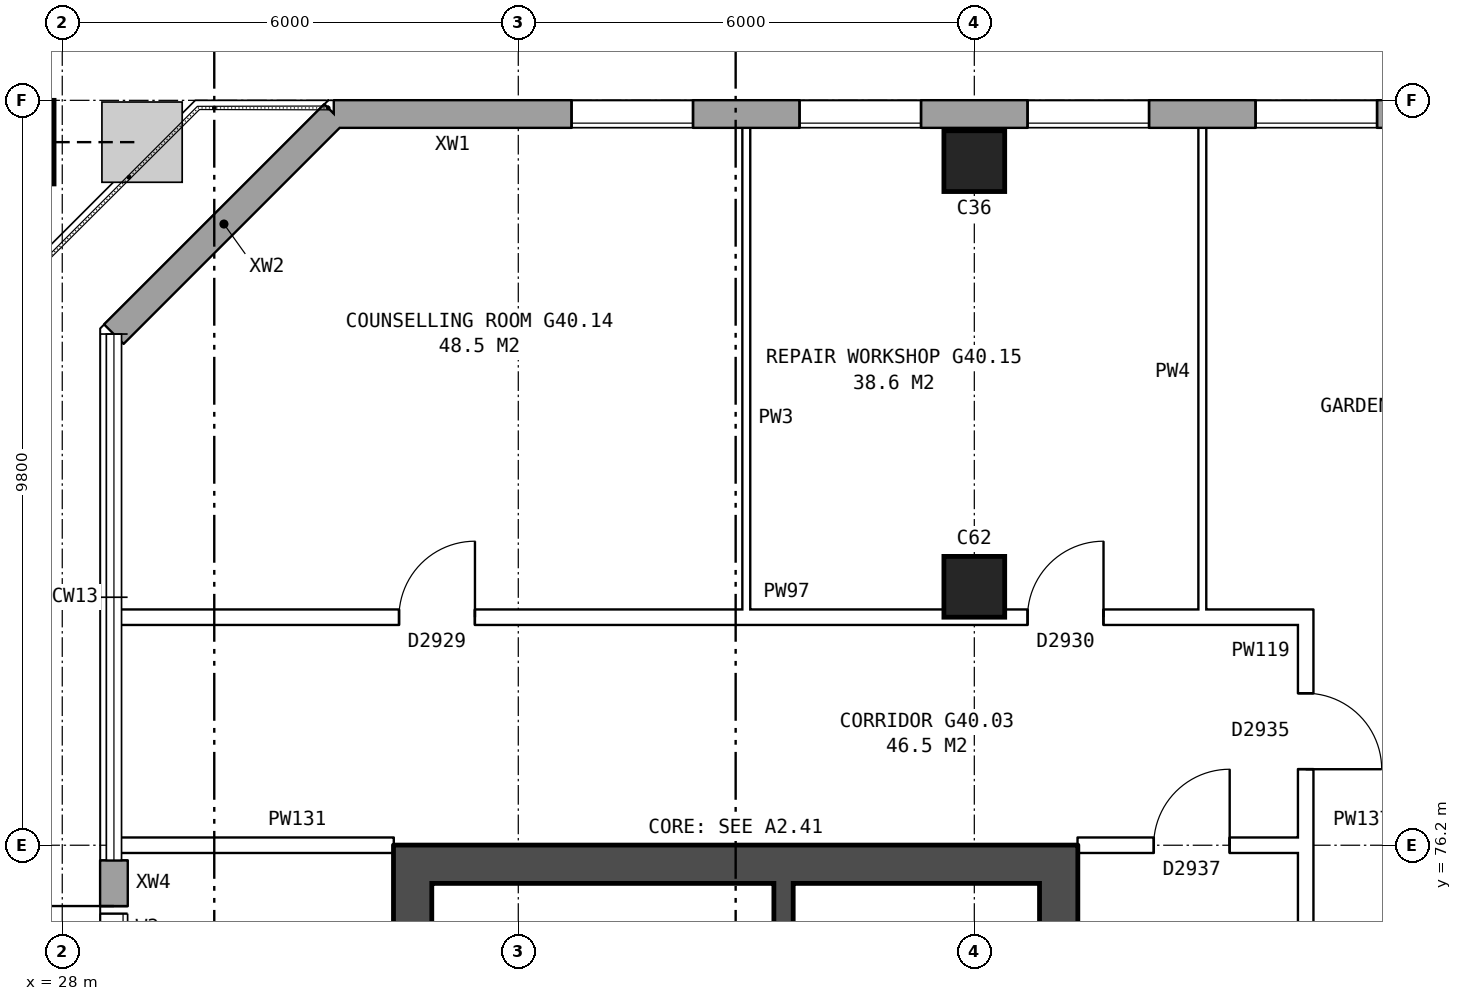
"""IFC4 building model, lengths in metres.
Left out: names, types, materials, properties, quantities, classifications, styles, units other than length and angle.
Written with IfcOpenShell. Run it as: python <this file> out.ifc"""

import sys

from ifc_helpers import new_model, si_unit, direction, frame, frame_2d, origin, origin_2d, place, context, subcontext, project, spatial, rectangle, hollow_rectangle, extrude, element, fill, save


model = new_model("IFC4")
c1 = context("Model", 3, precision=1e-05, world=origin(), true_north=direction((0.0, 1.0)))
c2 = subcontext(c1, "Body", "Model", "MODEL_VIEW")
j1 = project(units=[si_unit("LENGTHUNIT", "METRE"), si_unit("PLANEANGLEUNIT", "RADIAN")], contexts=[c1])
p1 = place(None, origin())
s1 = spatial("IfcSite", under=j1, at=p1, CompositionType="ELEMENT")
p2 = place(p1, origin())
s2 = spatial("IfcBuilding", under=s1, at=p2, CompositionType="ELEMENT")
p3 = place(p2, frame((0.0, 0.0, 142.3)))
s3 = spatial("IfcBuildingStorey", under=s2, at=p3, CompositionType="ELEMENT", Elevation=142.3)
for number, where, z_axis, x_axis in (
    (1, (40.0, 79.6, 0.0), (0.0, 0.0, 1.0), (1.0, 0.0, 0.0)),
    (2, (40.0, 85.2, 0.0), (0.0, 0.0, 1.0), (1.0, 0.0, 0.0)),
):
    element("IfcColumn", number, at=place(p3, frame(where, z_axis=z_axis, x_axis=x_axis)), inside=s3, PredefinedType="COLUMN", context=c2, shape_type="SweptSolid", body=[
        extrude(rectangle(XDim=0.8, YDim=0.8, at=origin_2d()), origin(), (0.0, 0.0, 1.0), 5.6),
    ])
p4 = place(p3, frame((27.342, 85.45, 0.149), z_axis=(0.27162754988, 0.0, 0.962402449158), x_axis=(0.0, 1.0, 0.0)))
e3 = element("IfcColumn", 3, at=p4, inside=s3, PredefinedType="COLUMN", context=c2, shape_type="SweptSolid", body=[
    extrude(hollow_rectangle(XDim=1.1, YDim=1.1, WallThickness=0.06, at=origin_2d()), origin(), (0.0, 0.0, 1.0), 6.132),
])
p5 = place(p3, frame((72.925, 85.82, 0.0), z_axis=(0.0, 0.0, 1.0), x_axis=(-1.0, 0.0, 0.0)))
e4 = element("IfcWall", 4, at=p5, inside=s3, PredefinedType="STANDARD", context=c2, shape_type="SweptSolid", body=[
    extrude(rectangle(XDim=41.351, YDim=0.36, at=frame_2d((20.675, 0.0))), origin(), (0.0, 0.0, 1.0), 5.6),
])
p6 = place(p5, frame((0.625, 0.0, 0.15)))
e5 = element("IfcOpeningElement", 5, at=p6, cuts=e4, PredefinedType="OPENING", context=c2, shape_type="SweptSolid", body=[
    extrude(rectangle(XDim=1.6, YDim=2.4, at=frame_2d((0.8, 1.2))), frame((0.0, 0.19, 0.0), z_axis=(0.0, -1.0, 0.0), x_axis=(1.0, 0.0, 0.0)), (0.0, 0.0, 1.0), 0.38),
])
p7 = place(p5, frame((3.625, 0.0, 0.15)))
e6 = element("IfcOpeningElement", 6, at=p7, cuts=e4, PredefinedType="OPENING", context=c2, shape_type="SweptSolid", body=[
    extrude(rectangle(XDim=1.6, YDim=2.4, at=frame_2d((0.8, 1.2))), frame((0.0, 0.19, 0.0), z_axis=(0.0, -1.0, 0.0), x_axis=(1.0, 0.0, 0.0)), (0.0, 0.0, 1.0), 0.38),
])
p8 = place(p5, frame((6.625, 0.0, 0.15)))
e7 = element("IfcOpeningElement", 7, at=p8, cuts=e4, PredefinedType="OPENING", context=c2, shape_type="SweptSolid", body=[
    extrude(rectangle(XDim=1.6, YDim=2.4, at=frame_2d((0.8, 1.2))), frame((0.0, 0.19, 0.0), z_axis=(0.0, -1.0, 0.0), x_axis=(1.0, 0.0, 0.0)), (0.0, 0.0, 1.0), 0.38),
])
p9 = place(p5, frame((9.625, 0.0, 0.15)))
e8 = element("IfcOpeningElement", 8, at=p9, cuts=e4, PredefinedType="OPENING", context=c2, shape_type="SweptSolid", body=[
    extrude(rectangle(XDim=1.6, YDim=2.4, at=frame_2d((0.8, 1.2))), frame((0.0, 0.19, 0.0), z_axis=(0.0, -1.0, 0.0), x_axis=(1.0, 0.0, 0.0)), (0.0, 0.0, 1.0), 0.38),
])
p10 = place(p5, frame((12.625, 0.0, 0.15)))
e9 = element("IfcOpeningElement", 9, at=p10, cuts=e4, PredefinedType="OPENING", context=c2, shape_type="SweptSolid", body=[
    extrude(rectangle(XDim=1.6, YDim=2.4, at=frame_2d((0.8, 1.2))), frame((0.0, 0.19, 0.0), z_axis=(0.0, -1.0, 0.0), x_axis=(1.0, 0.0, 0.0)), (0.0, 0.0, 1.0), 0.38),
])
p11 = place(p5, frame((15.625, 0.0, 0.15)))
e10 = element("IfcOpeningElement", 10, at=p11, cuts=e4, PredefinedType="OPENING", context=c2, shape_type="SweptSolid", body=[
    extrude(rectangle(XDim=1.6, YDim=2.4, at=frame_2d((0.8, 1.2))), frame((0.0, 0.19, 0.0), z_axis=(0.0, -1.0, 0.0), x_axis=(1.0, 0.0, 0.0)), (0.0, 0.0, 1.0), 0.38),
])
p12 = place(p5, frame((18.625, 0.0, 0.15)))
e11 = element("IfcOpeningElement", 11, at=p12, cuts=e4, PredefinedType="OPENING", context=c2, shape_type="SweptSolid", body=[
    extrude(rectangle(XDim=1.6, YDim=2.4, at=frame_2d((0.8, 1.2))), frame((0.0, 0.19, 0.0), z_axis=(0.0, -1.0, 0.0), x_axis=(1.0, 0.0, 0.0)), (0.0, 0.0, 1.0), 0.38),
])
p13 = place(p5, frame((21.625, 0.0, 0.15)))
e12 = element("IfcOpeningElement", 12, at=p13, cuts=e4, PredefinedType="OPENING", context=c2, shape_type="SweptSolid", body=[
    extrude(rectangle(XDim=1.6, YDim=2.4, at=frame_2d((0.8, 1.2))), frame((0.0, 0.19, 0.0), z_axis=(0.0, -1.0, 0.0), x_axis=(1.0, 0.0, 0.0)), (0.0, 0.0, 1.0), 0.38),
])
p14 = place(p5, frame((24.625, 0.0, 0.15)))
e13 = element("IfcOpeningElement", 13, at=p14, cuts=e4, PredefinedType="OPENING", context=c2, shape_type="SweptSolid", body=[
    extrude(rectangle(XDim=1.6, YDim=2.4, at=frame_2d((0.8, 1.2))), frame((0.0, 0.19, 0.0), z_axis=(0.0, -1.0, 0.0), x_axis=(1.0, 0.0, 0.0)), (0.0, 0.0, 1.0), 0.38),
])
p15 = place(p5, frame((27.625, 0.0, 0.15)))
e14 = element("IfcOpeningElement", 14, at=p15, cuts=e4, PredefinedType="OPENING", context=c2, shape_type="SweptSolid", body=[
    extrude(rectangle(XDim=1.6, YDim=2.4, at=frame_2d((0.8, 1.2))), frame((0.0, 0.19, 0.0), z_axis=(0.0, -1.0, 0.0), x_axis=(1.0, 0.0, 0.0)), (0.0, 0.0, 1.0), 0.38),
])
p16 = place(p5, frame((30.625, 0.0, 0.15)))
e15 = element("IfcOpeningElement", 15, at=p16, cuts=e4, PredefinedType="OPENING", context=c2, shape_type="SweptSolid", body=[
    extrude(rectangle(XDim=1.6, YDim=2.4, at=frame_2d((0.8, 1.2))), frame((0.0, 0.19, 0.0), z_axis=(0.0, -1.0, 0.0), x_axis=(1.0, 0.0, 0.0)), (0.0, 0.0, 1.0), 0.38),
])
p17 = place(p5, frame((33.625, 0.0, 0.15)))
e16 = element("IfcOpeningElement", 16, at=p17, cuts=e4, PredefinedType="OPENING", context=c2, shape_type="SweptSolid", body=[
    extrude(rectangle(XDim=1.6, YDim=2.4, at=frame_2d((0.8, 1.2))), frame((0.0, 0.19, 0.0), z_axis=(0.0, -1.0, 0.0), x_axis=(1.0, 0.0, 0.0)), (0.0, 0.0, 1.0), 0.38),
])
p18 = place(p5, frame((36.625, 0.0, 0.15)))
e17 = element("IfcOpeningElement", 17, at=p18, cuts=e4, PredefinedType="OPENING", context=c2, shape_type="SweptSolid", body=[
    extrude(rectangle(XDim=1.6, YDim=2.4, at=frame_2d((0.8, 1.2))), frame((0.0, 0.19, 0.0), z_axis=(0.0, -1.0, 0.0), x_axis=(1.0, 0.0, 0.0)), (0.0, 0.0, 1.0), 0.38),
])
p19 = place(p3, frame((31.575, 85.82, 0.0), z_axis=(0.0, 0.0, 1.0), x_axis=(-0.707106781187, -0.707106781187, 0.0)))
e18 = element("IfcWall", 18, at=p19, inside=s3, PredefinedType="STANDARD", context=c2, shape_type="SweptSolid", body=[
    extrude(rectangle(XDim=4.094, YDim=0.36, at=frame_2d((2.047, 0.0))), origin(), (0.0, 0.0, 1.0), 5.6),
])
p20 = place(p3, frame((28.68, 76.0, 0.0), z_axis=(0.0, 0.0, 1.0), x_axis=(0.0, -1.0, 0.0)))
e19 = element("IfcWall", 19, at=p20, inside=s3, PredefinedType="STANDARD", context=c2, shape_type="SweptSolid", body=[
    extrude(rectangle(XDim=3.0, YDim=0.36, at=frame_2d((1.5, 0.0))), origin(), (0.0, 0.0, 1.0), 5.6),
])
p21 = place(p20, frame((0.7, 0.0, 3.4)))
e20 = element("IfcOpeningElement", 20, at=p21, cuts=e19, PredefinedType="OPENING", context=c2, shape_type="SweptSolid", body=[
    extrude(rectangle(XDim=1.6, YDim=1.2, at=frame_2d((0.8, 0.6))), frame((0.0, 0.19, 0.0), z_axis=(0.0, -1.0, 0.0), x_axis=(1.0, 0.0, 0.0)), (0.0, 0.0, 1.0), 0.38),
])
p22 = place(p20, frame((0.6, 0.0, 0.0)))
e21 = element("IfcOpeningElement", 21, at=p22, cuts=e19, PredefinedType="OPENING", context=c2, shape_type="SweptSolid", body=[
    extrude(rectangle(XDim=1.8, YDim=2.4, at=frame_2d((0.9, 1.2))), frame((0.0, 0.19, 0.0), z_axis=(0.0, -1.0, 0.0), x_axis=(1.0, 0.0, 0.0)), (0.0, 0.0, 1.0), 0.38),
])
p23 = place(p3, frame((41.11, 76.2, 0.0), z_axis=(0.0, 0.0, 1.0), x_axis=(0.0, -1.0, 0.0)))
e22 = element("IfcWall", 22, at=p23, inside=s3, PredefinedType="SHEAR", context=c2, shape_type="SweptSolid", body=[
    extrude(rectangle(XDim=12.4, YDim=0.5, at=frame_2d((6.2, 0.0))), origin(), (0.0, 0.0, 1.0), 5.6),
])
p24 = place(p23, frame((1.325, 0.0, 0.0)))
e23 = element("IfcOpeningElement", 23, at=p24, cuts=e22, PredefinedType="OPENING", context=c2, shape_type="SweptSolid", body=[
    extrude(rectangle(XDim=1.1, YDim=2.1, at=frame_2d((0.55, 1.05))), frame((0.0, 0.26, 0.0), z_axis=(0.0, -1.0, 0.0), x_axis=(1.0, 0.0, 0.0)), (0.0, 0.0, 1.0), 0.52),
])
p25 = place(p23, frame((5.925, 0.0, 0.0)))
e24 = element("IfcOpeningElement", 24, at=p25, cuts=e22, PredefinedType="OPENING", context=c2, shape_type="SweptSolid", body=[
    extrude(rectangle(XDim=0.85, YDim=2.1, at=frame_2d((0.425, 1.05))), frame((0.0, 0.26, 0.0), z_axis=(0.0, -1.0, 0.0), x_axis=(1.0, 0.0, 0.0)), (0.0, 0.0, 1.0), 0.52),
])
p26 = place(p23, frame((9.9, 0.0, 0.0)))
e25 = element("IfcOpeningElement", 25, at=p26, cuts=e22, PredefinedType="OPENING", context=c2, shape_type="SweptSolid", body=[
    extrude(rectangle(XDim=1.1, YDim=2.1, at=frame_2d((0.55, 1.05))), frame((0.0, 0.26, 0.0), z_axis=(0.0, -1.0, 0.0), x_axis=(1.0, 0.0, 0.0)), (0.0, 0.0, 1.0), 0.52),
])
p27 = place(p3, frame((32.61, 76.2, 0.0), z_axis=(0.0, 0.0, 1.0), x_axis=(0.0, -1.0, 0.0)))
e26 = element("IfcWall", 26, at=p27, inside=s3, PredefinedType="SHEAR", context=c2, shape_type="SweptSolid", body=[
    extrude(rectangle(XDim=12.4, YDim=0.5, at=frame_2d((6.2, 0.0))), origin(), (0.0, 0.0, 1.0), 5.6),
])
p28 = place(p3, frame((40.86, 75.95, 0.0), z_axis=(0.0, 0.0, 1.0), x_axis=(-1.0, 0.0, 0.0)))
e27 = element("IfcWall", 27, at=p28, inside=s3, PredefinedType="SHEAR", context=c2, shape_type="SweptSolid", body=[
    extrude(rectangle(XDim=8.0, YDim=0.5, at=frame_2d((4.0, 0.0))), origin(), (0.0, 0.0, 1.0), 5.6),
])
p29 = place(p3, frame((37.49, 75.7, 0.0), z_axis=(0.0, 0.0, 1.0), x_axis=(0.0, -1.0, 0.0)))
e28 = element("IfcWall", 28, at=p29, inside=s3, PredefinedType="SHEAR", context=c2, shape_type="SweptSolid", body=[
    extrude(rectangle(XDim=2.425, YDim=0.25, at=frame_2d((1.212, 0.0))), origin(), (0.0, 0.0, 1.0), 5.6),
])
p30 = place(p3, frame((44.36, 63.9, 0.0), z_axis=(0.0, 0.0, 1.0), x_axis=(0.0, 1.0, 0.0)))
e29 = element("IfcWall", 29, at=p30, inside=s3, PredefinedType="PARTITIONING", context=c2, shape_type="SweptSolid", body=[
    extrude(rectangle(XDim=12.2, YDim=0.2, at=frame_2d((6.1, 0.0))), origin(), (0.0, 0.0, 1.0), 5.6),
])
p31 = place(p30, frame((5.1, 0.0, 0.0)))
e30 = element("IfcOpeningElement", 30, at=p31, cuts=e29, PredefinedType="OPENING", context=c2, shape_type="SweptSolid", body=[
    extrude(rectangle(XDim=2.0, YDim=2.1, at=frame_2d((1.0, 1.05))), frame((0.0, 0.11, 0.0), z_axis=(0.0, -1.0, 0.0), x_axis=(1.0, 0.0, 0.0)), (0.0, 0.0, 1.0), 0.22),
])
p32 = place(p3, frame((28.74, 76.2, 0.0), z_axis=(0.0, 0.0, 1.0), x_axis=(1.0, 0.0, 0.0)))
e31 = element("IfcWall", 31, at=p32, inside=s3, PredefinedType="PARTITIONING", context=c2, shape_type="SweptSolid", body=[
    extrude(rectangle(XDim=3.62, YDim=0.2, at=frame_2d((1.81, 0.0))), origin(), (0.0, 0.0, 1.0), 5.6),
])
p33 = place(p3, frame((41.36, 76.2, 0.0), z_axis=(0.0, 0.0, 1.0), x_axis=(1.0, 0.0, 0.0)))
e32 = element("IfcWall", 32, at=p33, inside=s3, PredefinedType="PARTITIONING", context=c2, shape_type="SweptSolid", body=[
    extrude(rectangle(XDim=3.1, YDim=0.2, at=frame_2d((1.55, 0.0))), origin(), (0.0, 0.0, 1.0), 5.6),
])
p34 = place(p33, frame((1.0, 0.0, 0.0)))
e33 = element("IfcOpeningElement", 33, at=p34, cuts=e32, PredefinedType="OPENING", context=c2, shape_type="SweptSolid", body=[
    extrude(rectangle(XDim=1.0, YDim=2.1, at=frame_2d((0.5, 1.05))), frame((0.0, 0.11, 0.0), z_axis=(0.0, -1.0, 0.0), x_axis=(1.0, 0.0, 0.0)), (0.0, 0.0, 1.0), 0.22),
])
p35 = place(p3, frame((28.74, 79.2, 0.0), z_axis=(0.0, 0.0, 1.0), x_axis=(1.0, 0.0, 0.0)))
e34 = element("IfcWall", 34, at=p35, inside=s3, PredefinedType="PARTITIONING", context=c2, shape_type="SweptSolid", body=[
    extrude(rectangle(XDim=15.72, YDim=0.2, at=frame_2d((7.86, 0.0))), origin(), (0.0, 0.0, 1.0), 5.6),
])
p36 = place(p35, frame((3.69, 0.0, 0.0)))
e35 = element("IfcOpeningElement", 35, at=p36, cuts=e34, PredefinedType="OPENING", context=c2, shape_type="SweptSolid", body=[
    extrude(rectangle(XDim=1.0, YDim=2.1, at=frame_2d((0.5, 1.05))), frame((0.0, 0.11, 0.0), z_axis=(0.0, -1.0, 0.0), x_axis=(1.0, 0.0, 0.0)), (0.0, 0.0, 1.0), 0.22),
])
p37 = place(p35, frame((11.96, 0.0, 0.0)))
e36 = element("IfcOpeningElement", 36, at=p37, cuts=e34, PredefinedType="OPENING", context=c2, shape_type="SweptSolid", body=[
    extrude(rectangle(XDim=1.0, YDim=2.1, at=frame_2d((0.5, 1.05))), frame((0.0, 0.11, 0.0), z_axis=(0.0, -1.0, 0.0), x_axis=(1.0, 0.0, 0.0)), (0.0, 0.0, 1.0), 0.22),
])
for number, where, z_axis, x_axis in (
    (37, (37.0, 79.1, 0.0), (0.0, 0.0, 1.0), (0.0, 1.0, 0.0)),
    (38, (43.0, 79.1, 0.0), (0.0, 0.0, 1.0), (0.0, 1.0, 0.0)),
):
    element("IfcWall", number, at=place(p3, frame(where, z_axis=z_axis, x_axis=x_axis)), inside=s3, PredefinedType="PARTITIONING", context=c2, shape_type="SweptSolid", body=[
        extrude(rectangle(XDim=6.66, YDim=0.1, at=frame_2d((3.33, 0.0))), origin(), (0.0, 0.0, 1.0), 5.6),
    ])
p38 = place(p3, frame((44.36, 76.1, 0.0), z_axis=(0.0, 0.0, 1.0), x_axis=(0.0, 1.0, 0.0)))
e39 = element("IfcWall", 39, at=p38, inside=s3, PredefinedType="PARTITIONING", context=c2, shape_type="SweptSolid", body=[
    extrude(rectangle(XDim=3.2, YDim=0.2, at=frame_2d((1.6, 0.0))), origin(), (0.0, 0.0, 1.0), 5.6),
])
p39 = place(p38, frame((1.1, 0.0, 0.0)))
e40 = element("IfcOpeningElement", 40, at=p39, cuts=e39, PredefinedType="OPENING", context=c2, shape_type="SweptSolid", body=[
    extrude(rectangle(XDim=1.0, YDim=2.1, at=frame_2d((0.5, 1.05))), frame((0.0, 0.11, 0.0), z_axis=(0.0, -1.0, 0.0), x_axis=(1.0, 0.0, 0.0)), (0.0, 0.0, 1.0), 0.22),
])
p40 = place(p15, origin())
e41 = element("IfcWindow", 41, at=p40, inside=s3, PartitioningType="SINGLE_PANEL", PredefinedType="WINDOW", context=c2, shape_type="SweptSolid", body=[
    extrude(rectangle(XDim=1.6, YDim=2.4, at=frame_2d((0.8, 1.2))), frame((0.0, 0.15, 0.0), z_axis=(0.0, -1.0, 0.0), x_axis=(1.0, 0.0, 0.0)), (0.0, 0.0, 1.0), 0.06),
])
fill(e14, e41)
p41 = place(p16, origin())
e42 = element("IfcWindow", 42, at=p41, inside=s3, PartitioningType="SINGLE_PANEL", PredefinedType="WINDOW", context=c2, shape_type="SweptSolid", body=[
    extrude(rectangle(XDim=1.6, YDim=2.4, at=frame_2d((0.8, 1.2))), frame((0.0, 0.15, 0.0), z_axis=(0.0, -1.0, 0.0), x_axis=(1.0, 0.0, 0.0)), (0.0, 0.0, 1.0), 0.06),
])
fill(e15, e42)
p42 = place(p17, origin())
e43 = element("IfcWindow", 43, at=p42, inside=s3, PartitioningType="SINGLE_PANEL", PredefinedType="WINDOW", context=c2, shape_type="SweptSolid", body=[
    extrude(rectangle(XDim=1.6, YDim=2.4, at=frame_2d((0.8, 1.2))), frame((0.0, 0.15, 0.0), z_axis=(0.0, -1.0, 0.0), x_axis=(1.0, 0.0, 0.0)), (0.0, 0.0, 1.0), 0.06),
])
fill(e16, e43)
p43 = place(p18, origin())
e44 = element("IfcWindow", 44, at=p43, inside=s3, PartitioningType="SINGLE_PANEL", PredefinedType="WINDOW", context=c2, shape_type="SweptSolid", body=[
    extrude(rectangle(XDim=1.6, YDim=2.4, at=frame_2d((0.8, 1.2))), frame((0.0, 0.15, 0.0), z_axis=(0.0, -1.0, 0.0), x_axis=(1.0, 0.0, 0.0)), (0.0, 0.0, 1.0), 0.06),
])
fill(e17, e44)
p44 = place(p21, origin())
e45 = element("IfcWindow", 45, at=p44, inside=s3, PartitioningType="DOUBLE_PANEL_HORIZONTAL", PredefinedType="WINDOW", context=c2, shape_type="SweptSolid", body=[
    extrude(rectangle(XDim=1.6, YDim=1.2, at=frame_2d((0.8, 0.6))), frame((0.0, 0.15, 0.0), z_axis=(0.0, -1.0, 0.0), x_axis=(1.0, 0.0, 0.0)), (0.0, 0.0, 1.0), 0.06),
])
fill(e20, e45)
p45 = place(p22, frame((1.8, 0.0, 0.0), z_axis=(0.0, 0.0, 1.0), x_axis=(-1.0, 0.0, 0.0)))
e46 = element("IfcDoor", 46, at=p45, inside=s3, OperationType="DOUBLE_DOOR_SINGLE_SWING", PredefinedType="DOOR", context=c2, shape_type="SweptSolid", body=[
    extrude(rectangle(XDim=1.8, YDim=2.4, at=frame_2d((0.9, 1.2))), frame((0.0, 0.025, 0.0), z_axis=(0.0, -1.0, 0.0), x_axis=(1.0, 0.0, 0.0)), (0.0, 0.0, 1.0), 0.05),
])
fill(e21, e46)
p46 = place(p34, origin())
e47 = element("IfcDoor", 47, at=p46, inside=s3, OperationType="SINGLE_SWING_RIGHT", PredefinedType="DOOR", context=c2, shape_type="SweptSolid", body=[
    extrude(rectangle(XDim=1.0, YDim=2.1, at=frame_2d((0.5, 1.05))), frame((0.0, 0.025, 0.0), z_axis=(0.0, -1.0, 0.0), x_axis=(1.0, 0.0, 0.0)), (0.0, 0.0, 1.0), 0.05),
])
fill(e33, e47)
p47 = place(p36, origin())
e48 = element("IfcDoor", 48, at=p47, inside=s3, OperationType="SINGLE_SWING_RIGHT", PredefinedType="DOOR", context=c2, shape_type="SweptSolid", body=[
    extrude(rectangle(XDim=1.0, YDim=2.1, at=frame_2d((0.5, 1.05))), frame((0.0, 0.025, 0.0), z_axis=(0.0, -1.0, 0.0), x_axis=(1.0, 0.0, 0.0)), (0.0, 0.0, 1.0), 0.05),
])
fill(e35, e48)
p48 = place(p37, origin())
e49 = element("IfcDoor", 49, at=p48, inside=s3, OperationType="SINGLE_SWING_RIGHT", PredefinedType="DOOR", context=c2, shape_type="SweptSolid", body=[
    extrude(rectangle(XDim=1.0, YDim=2.1, at=frame_2d((0.5, 1.05))), frame((0.0, 0.025, 0.0), z_axis=(0.0, -1.0, 0.0), x_axis=(1.0, 0.0, 0.0)), (0.0, 0.0, 1.0), 0.05),
])
fill(e36, e49)
p49 = place(p39, frame((1.0, 0.0, 0.0), z_axis=(0.0, 0.0, 1.0), x_axis=(-1.0, 0.0, 0.0)))
e50 = element("IfcDoor", 50, at=p49, inside=s3, OperationType="SINGLE_SWING_RIGHT", PredefinedType="DOOR", context=c2, shape_type="SweptSolid", body=[
    extrude(rectangle(XDim=1.0, YDim=2.1, at=frame_2d((0.5, 1.05))), frame((0.0, 0.025, 0.0), z_axis=(0.0, -1.0, 0.0), x_axis=(1.0, 0.0, 0.0)), (0.0, 0.0, 1.0), 0.05),
])
fill(e40, e50)
save(model, sys.argv[1])
